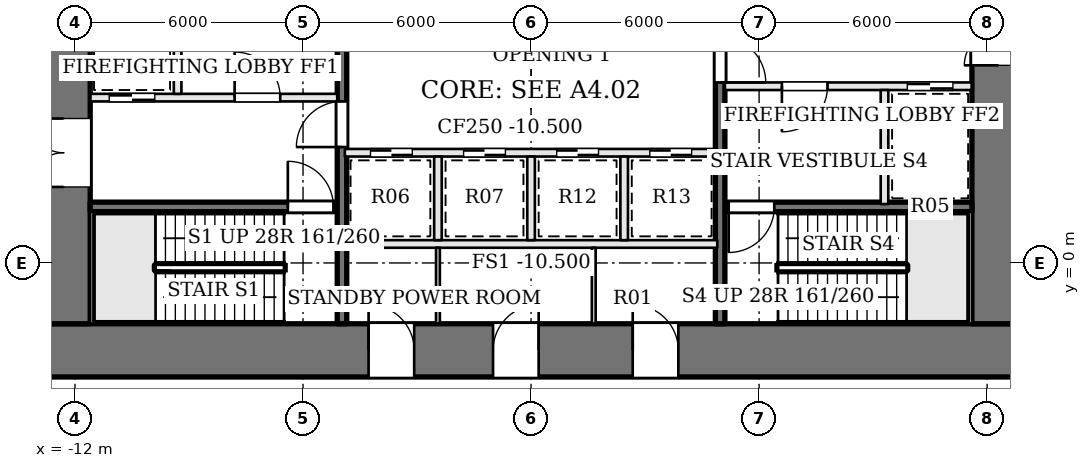
"""IFC4 building model, lengths in metres.
Left out: names, types, materials, properties, quantities, classifications, styles, units other than length and angle.
Written with IfcOpenShell. Run it as: python <this file> out.ifc"""

import sys

from ifc_helpers import new_model, si_unit, direction, frame, frame_2d, origin, place, context, subcontext, project, spatial, rectangle, extrude, element, fill, save


model = new_model("IFC4")
c1 = context("Model", 3, precision=1e-05, world=origin(), true_north=direction((0.0, 1.0)))
c2 = subcontext(c1, "Body", "Model", "MODEL_VIEW")
j1 = project(units=[si_unit("LENGTHUNIT", "METRE"), si_unit("PLANEANGLEUNIT", "RADIAN")], contexts=[c1])
p1 = place(None, origin())
s1 = spatial("IfcSite", under=j1, at=p1, CompositionType="ELEMENT")
p2 = place(p1, origin())
s2 = spatial("IfcBuilding", under=s1, at=p2, CompositionType="ELEMENT")
p3 = place(p2, frame((0.0, 0.0, -10.5)))
s3 = spatial("IfcBuildingStorey", under=s2, at=p3, CompositionType="ELEMENT", Elevation=-10.5)
p4 = place(p3, frame((-13.0, -2.3, 0.0), z_axis=(0.0, 0.0, 1.0), x_axis=(1.0, 0.0, 0.0)))
e1 = element("IfcWall", 1, at=p4, inside=s3, PredefinedType="SHEAR", context=c2, shape_type="SweptSolid", body=[
    extrude(rectangle(XDim=26.0, YDim=1.4, at=frame_2d((13.0, 0.0))), origin(), (0.0, 0.0, 1.0), 4.5),
])
p5 = place(p4, frame((8.725, 0.0, 0.0)))
e2 = element("IfcOpeningElement", 2, at=p5, cuts=e1, PredefinedType="OPENING", context=c2, shape_type="SweptSolid", body=[
    extrude(rectangle(XDim=1.2, YDim=2.1, at=frame_2d((0.6, 1.05))), frame((0.0, 0.71, 0.0), z_axis=(0.0, -1.0, 0.0), x_axis=(1.0, 0.0, 0.0)), (0.0, 0.0, 1.0), 1.42),
])
p6 = place(p4, frame((12.0, 0.0, 0.0)))
e3 = element("IfcOpeningElement", 3, at=p6, cuts=e1, PredefinedType="OPENING", context=c2, shape_type="SweptSolid", body=[
    extrude(rectangle(XDim=1.2, YDim=2.1, at=frame_2d((0.6, 1.05))), frame((0.0, 0.71, 0.0), z_axis=(0.0, -1.0, 0.0), x_axis=(1.0, 0.0, 0.0)), (0.0, 0.0, 1.0), 1.42),
])
p7 = place(p4, frame((15.675, 0.0, 0.0)))
e4 = element("IfcOpeningElement", 4, at=p7, cuts=e1, PredefinedType="OPENING", context=c2, shape_type="SweptSolid", body=[
    extrude(rectangle(XDim=1.2, YDim=2.1, at=frame_2d((0.6, 1.05))), frame((0.0, 0.71, 0.0), z_axis=(0.0, -1.0, 0.0), x_axis=(1.0, 0.0, 0.0)), (0.0, 0.0, 1.0), 1.42),
])
p8 = place(p3, frame((12.3, -1.6, 0.0), z_axis=(0.0, 0.0, 1.0), x_axis=(0.0, 1.0, 0.0)))
e5 = element("IfcWall", 5, at=p8, inside=s3, PredefinedType="SHEAR", context=c2, shape_type="SweptSolid", body=[
    extrude(rectangle(XDim=12.2, YDim=1.4, at=frame_2d((6.1, 0.0))), origin(), (0.0, 0.0, 1.0), 4.5),
])
p9 = place(p8, frame((6.8, 0.0, 0.0)))
e6 = element("IfcOpeningElement", 6, at=p9, cuts=e5, PredefinedType="OPENING", context=c2, shape_type="SweptSolid", body=[
    extrude(rectangle(XDim=1.8, YDim=2.1, at=frame_2d((0.9, 1.05))), frame((0.0, 0.71, 0.0), z_axis=(0.0, -1.0, 0.0), x_axis=(1.0, 0.0, 0.0)), (0.0, 0.0, 1.0), 1.42),
])
p10 = place(p3, frame((-12.3, -1.6, 0.0), z_axis=(0.0, 0.0, 1.0), x_axis=(0.0, 1.0, 0.0)))
e7 = element("IfcWall", 7, at=p10, inside=s3, PredefinedType="SHEAR", context=c2, shape_type="SweptSolid", body=[
    extrude(rectangle(XDim=12.2, YDim=1.4, at=frame_2d((6.1, 0.0))), origin(), (0.0, 0.0, 1.0), 4.5),
])
p11 = place(p10, frame((3.6, 0.0, 0.0)))
e8 = element("IfcOpeningElement", 8, at=p11, cuts=e7, PredefinedType="OPENING", context=c2, shape_type="SweptSolid", body=[
    extrude(rectangle(XDim=1.8, YDim=2.1, at=frame_2d((0.9, 1.05))), frame((0.0, 0.71, 0.0), z_axis=(0.0, -1.0, 0.0), x_axis=(1.0, 0.0, 0.0)), (0.0, 0.0, 1.0), 1.42),
])
p12 = place(p3, frame((-11.6, 1.475, 0.0), z_axis=(0.0, 0.0, 1.0), x_axis=(1.0, 0.0, 0.0)))
e9 = element("IfcWall", 9, at=p12, inside=s3, PredefinedType="SOLIDWALL", context=c2, shape_type="SweptSolid", body=[
    extrude(rectangle(XDim=6.5, YDim=0.25, at=frame_2d((3.25, 0.0))), origin(), (0.0, 0.0, 1.0), 4.2),
])
p13 = place(p12, frame((5.2, 0.0, 0.0)))
e10 = element("IfcOpeningElement", 10, at=p13, cuts=e9, PredefinedType="OPENING", context=c2, shape_type="SweptSolid", body=[
    extrude(rectangle(XDim=1.2, YDim=2.1, at=frame_2d((0.6, 1.05))), frame((0.0, 0.135, 0.0), z_axis=(0.0, -1.0, 0.0), x_axis=(1.0, 0.0, 0.0)), (0.0, 0.0, 1.0), 0.27),
])
p14 = place(p3, frame((-11.6, 4.35, 0.0), z_axis=(0.0, 0.0, 1.0), x_axis=(1.0, 0.0, 0.0)))
e11 = element("IfcWall", 11, at=p14, inside=s3, PredefinedType="SOLIDWALL", context=c2, shape_type="SweptSolid", body=[
    extrude(rectangle(XDim=6.5, YDim=0.2, at=frame_2d((3.25, 0.0))), origin(), (0.0, 0.0, 1.0), 4.2),
])
p15 = place(p14, frame((3.8, 0.0, 0.0)))
e12 = element("IfcOpeningElement", 12, at=p15, cuts=e11, PredefinedType="OPENING", context=c2, shape_type="SweptSolid", body=[
    extrude(rectangle(XDim=1.2, YDim=2.1, at=frame_2d((0.6, 1.05))), frame((0.0, 0.11, 0.0), z_axis=(0.0, -1.0, 0.0), x_axis=(1.0, 0.0, 0.0)), (0.0, 0.0, 1.0), 0.22),
])
p16 = place(p14, frame((0.5, 0.0, 0.0)))
e13 = element("IfcOpeningElement", 13, at=p16, cuts=e11, PredefinedType="OPENING", context=c2, shape_type="SweptSolid", body=[
    extrude(rectangle(XDim=1.2, YDim=2.1, at=frame_2d((0.6, 1.05))), frame((0.0, 0.11, 0.0), z_axis=(0.0, -1.0, 0.0), x_axis=(1.0, 0.0, 0.0)), (0.0, 0.0, 1.0), 0.22),
])
p17 = place(p3, frame((11.6, 4.65, 0.0), z_axis=(0.0, 0.0, 1.0), x_axis=(-1.0, 0.0, 0.0)))
e14 = element("IfcWall", 14, at=p17, inside=s3, PredefinedType="SOLIDWALL", context=c2, shape_type="SweptSolid", body=[
    extrude(rectangle(XDim=6.5, YDim=0.2, at=frame_2d((3.25, 0.0))), origin(), (0.0, 0.0, 1.0), 4.2),
])
p18 = place(p17, frame((3.8, 0.0, 0.0)))
e15 = element("IfcOpeningElement", 15, at=p18, cuts=e14, PredefinedType="OPENING", context=c2, shape_type="SweptSolid", body=[
    extrude(rectangle(XDim=1.2, YDim=2.1, at=frame_2d((0.6, 1.05))), frame((0.0, 0.11, 0.0), z_axis=(0.0, -1.0, 0.0), x_axis=(1.0, 0.0, 0.0)), (0.0, 0.0, 1.0), 0.22),
])
p19 = place(p17, frame((0.5, 0.0, 0.0)))
e16 = element("IfcOpeningElement", 16, at=p19, cuts=e14, PredefinedType="OPENING", context=c2, shape_type="SweptSolid", body=[
    extrude(rectangle(XDim=1.2, YDim=2.1, at=frame_2d((0.6, 1.05))), frame((0.0, 0.11, 0.0), z_axis=(0.0, -1.0, 0.0), x_axis=(1.0, 0.0, 0.0)), (0.0, 0.0, 1.0), 0.22),
])
p20 = place(p3, frame((11.6, 1.475, 0.0), z_axis=(0.0, 0.0, 1.0), x_axis=(-1.0, 0.0, 0.0)))
e17 = element("IfcWall", 17, at=p20, inside=s3, PredefinedType="SOLIDWALL", context=c2, shape_type="SweptSolid", body=[
    extrude(rectangle(XDim=6.5, YDim=0.25, at=frame_2d((3.25, 0.0))), origin(), (0.0, 0.0, 1.0), 4.2),
])
p21 = place(p20, frame((5.2, 0.0, 0.0)))
e18 = element("IfcOpeningElement", 18, at=p21, cuts=e17, PredefinedType="OPENING", context=c2, shape_type="SweptSolid", body=[
    extrude(rectangle(XDim=1.2, YDim=2.1, at=frame_2d((0.6, 1.05))), frame((0.0, 0.135, 0.0), z_axis=(0.0, -1.0, 0.0), x_axis=(1.0, 0.0, 0.0)), (0.0, 0.0, 1.0), 0.27),
])
for number, where, z_axis, x_axis in (
    (19, (-9.3, 4.45, 0.0), (0.0, 0.0, 1.0), (0.0, 1.0, 0.0)),
    (20, (9.3, 4.55, 0.0), (0.0, 0.0, 1.0), (0.0, -1.0, 0.0)),
):
    element("IfcWall", number, at=place(p3, frame(where, z_axis=z_axis, x_axis=x_axis)), inside=s3, PredefinedType="SOLIDWALL", context=c2, shape_type="SweptSolid", body=[
        extrude(rectangle(XDim=3.0, YDim=0.2, at=frame_2d((1.5, 0.0))), origin(), (0.0, 0.0, 1.0), 4.2),
    ])
p22 = place(p3, frame((-4.975, -1.6, 0.0), z_axis=(0.0, 0.0, 1.0), x_axis=(0.0, 1.0, 0.0)))
e21 = element("IfcWall", 21, at=p22, inside=s3, PredefinedType="SOLIDWALL", context=c2, shape_type="SweptSolid", body=[
    extrude(rectangle(XDim=12.2, YDim=0.25, at=frame_2d((6.1, 0.0))), origin(), (0.0, 0.0, 1.0), 4.2),
])
p23 = place(p22, frame((4.65, 0.0, 0.0)))
e22 = element("IfcOpeningElement", 22, at=p23, cuts=e21, PredefinedType="OPENING", context=c2, shape_type="SweptSolid", body=[
    extrude(rectangle(XDim=1.2, YDim=2.1, at=frame_2d((0.6, 1.05))), frame((0.0, 0.135, 0.0), z_axis=(0.0, -1.0, 0.0), x_axis=(1.0, 0.0, 0.0)), (0.0, 0.0, 1.0), 0.27),
])
p24 = place(p3, frame((4.975, 10.6, 0.0), z_axis=(0.0, 0.0, 1.0), x_axis=(0.0, -1.0, 0.0)))
e23 = element("IfcWall", 23, at=p24, inside=s3, PredefinedType="SOLIDWALL", context=c2, shape_type="SweptSolid", body=[
    extrude(rectangle(XDim=12.2, YDim=0.25, at=frame_2d((6.1, 0.0))), origin(), (0.0, 0.0, 1.0), 4.2),
])
p25 = place(p24, frame((4.65, 0.0, 0.0)))
e24 = element("IfcOpeningElement", 24, at=p25, cuts=e23, PredefinedType="OPENING", context=c2, shape_type="SweptSolid", body=[
    extrude(rectangle(XDim=1.2, YDim=2.1, at=frame_2d((0.6, 1.05))), frame((0.0, 0.135, 0.0), z_axis=(0.0, -1.0, 0.0), x_axis=(1.0, 0.0, 0.0)), (0.0, 0.0, 1.0), 0.27),
])
p26 = place(p3, frame((-4.9, 0.5, 0.0), z_axis=(0.0, 0.0, 1.0), x_axis=(1.0, 0.0, 0.0)))
e25 = element("IfcWall", 25, at=p26, inside=s3, PredefinedType="SOLIDWALL", context=c2, shape_type="SweptSolid", body=[
    extrude(rectangle(XDim=9.8, YDim=0.2, at=frame_2d((4.9, 0.0))), origin(), (0.0, 0.0, 1.0), 4.2),
])
p27 = place(p3, frame((-4.9, 2.9, 0.0), z_axis=(0.0, 0.0, 1.0), x_axis=(1.0, 0.0, 0.0)))
e26 = element("IfcWall", 26, at=p27, inside=s3, PredefinedType="SOLIDWALL", context=c2, shape_type="SweptSolid", body=[
    extrude(rectangle(XDim=9.8, YDim=0.2, at=frame_2d((4.9, 0.0))), origin(), (0.0, 0.0, 1.0), 4.2),
])
p28 = place(p27, frame((0.675, 0.0, 0.0)))
e27 = element("IfcOpeningElement", 27, at=p28, cuts=e26, PredefinedType="OPENING", context=c2, shape_type="SweptSolid", body=[
    extrude(rectangle(XDim=1.1, YDim=2.1, at=frame_2d((0.55, 1.05))), frame((0.0, 0.11, 0.0), z_axis=(0.0, -1.0, 0.0), x_axis=(1.0, 0.0, 0.0)), (0.0, 0.0, 1.0), 0.22),
])
p29 = place(p27, frame((3.125, 0.0, 0.0)))
e28 = element("IfcOpeningElement", 28, at=p29, cuts=e26, PredefinedType="OPENING", context=c2, shape_type="SweptSolid", body=[
    extrude(rectangle(XDim=1.1, YDim=2.1, at=frame_2d((0.55, 1.05))), frame((0.0, 0.11, 0.0), z_axis=(0.0, -1.0, 0.0), x_axis=(1.0, 0.0, 0.0)), (0.0, 0.0, 1.0), 0.22),
])
p30 = place(p27, frame((5.575, 0.0, 0.0)))
e29 = element("IfcOpeningElement", 29, at=p30, cuts=e26, PredefinedType="OPENING", context=c2, shape_type="SweptSolid", body=[
    extrude(rectangle(XDim=1.1, YDim=2.1, at=frame_2d((0.55, 1.05))), frame((0.0, 0.11, 0.0), z_axis=(0.0, -1.0, 0.0), x_axis=(1.0, 0.0, 0.0)), (0.0, 0.0, 1.0), 0.22),
])
p31 = place(p27, frame((8.025, 0.0, 0.0)))
e30 = element("IfcOpeningElement", 30, at=p31, cuts=e26, PredefinedType="OPENING", context=c2, shape_type="SweptSolid", body=[
    extrude(rectangle(XDim=1.1, YDim=2.1, at=frame_2d((0.55, 1.05))), frame((0.0, 0.11, 0.0), z_axis=(0.0, -1.0, 0.0), x_axis=(1.0, 0.0, 0.0)), (0.0, 0.0, 1.0), 0.22),
])
for number, where, z_axis, x_axis in (
    (31, (-2.45, 0.6, 0.0), (0.0, 0.0, 1.0), (0.0, 1.0, 0.0)),
    (32, (0.0, 0.6, 0.0), (0.0, 0.0, 1.0), (0.0, 1.0, 0.0)),
    (33, (2.45, 0.6, 0.0), (0.0, 0.0, 1.0), (0.0, 1.0, 0.0)),
):
    element("IfcWall", number, at=place(p3, frame(where, z_axis=z_axis, x_axis=x_axis)), inside=s3, PredefinedType="SOLIDWALL", context=c2, shape_type="SweptSolid", body=[
        extrude(rectangle(XDim=2.2, YDim=0.2, at=frame_2d((1.1, 0.0))), origin(), (0.0, 0.0, 1.0), 4.2),
    ])
for number, where, z_axis, x_axis in (
    (34, (-2.45, -1.6, 0.0), (0.0, 0.0, 1.0), (0.0, 1.0, 0.0)),
    (35, (1.65, -1.6, 0.0), (0.0, 0.0, 1.0), (0.0, 1.0, 0.0)),
):
    element("IfcWall", number, at=place(p3, frame(where, z_axis=z_axis, x_axis=x_axis)), inside=s3, PredefinedType="PARTITIONING", context=c2, shape_type="SweptSolid", body=[
        extrude(rectangle(XDim=2.0, YDim=0.1, at=frame_2d((1.0, 0.0))), origin(), (0.0, 0.0, 1.0), 4.2),
    ])
p32 = place(p11, origin())
e36 = element("IfcDoor", 36, at=p32, inside=s3, OperationType="DOUBLE_DOOR_SINGLE_SWING", PredefinedType="DOOR", context=c2, shape_type="SweptSolid", body=[
    extrude(rectangle(XDim=1.8, YDim=2.1, at=frame_2d((0.9, 1.05))), frame((0.0, 0.025, 0.0), z_axis=(0.0, -1.0, 0.0), x_axis=(1.0, 0.0, 0.0)), (0.0, 0.0, 1.0), 0.05),
])
fill(e8, e36)
p33 = place(p9, origin())
e37 = element("IfcDoor", 37, at=p33, inside=s3, OperationType="DOUBLE_DOOR_SINGLE_SWING", PredefinedType="DOOR", context=c2, shape_type="SweptSolid", body=[
    extrude(rectangle(XDim=1.8, YDim=2.1, at=frame_2d((0.9, 1.05))), frame((0.0, 0.025, 0.0), z_axis=(0.0, -1.0, 0.0), x_axis=(1.0, 0.0, 0.0)), (0.0, 0.0, 1.0), 0.05),
])
fill(e6, e37)
p34 = place(p23, origin())
e38 = element("IfcDoor", 38, at=p34, inside=s3, OperationType="SINGLE_SWING_LEFT", PredefinedType="DOOR", context=c2, shape_type="SweptSolid", body=[
    extrude(rectangle(XDim=1.2, YDim=2.1, at=frame_2d((0.6, 1.05))), frame((0.0, 0.025, 0.0), z_axis=(0.0, -1.0, 0.0), x_axis=(1.0, 0.0, 0.0)), (0.0, 0.0, 1.0), 0.05),
])
fill(e22, e38)
p35 = place(p25, origin())
e39 = element("IfcDoor", 39, at=p35, inside=s3, OperationType="SINGLE_SWING_RIGHT", PredefinedType="DOOR", context=c2, shape_type="SweptSolid", body=[
    extrude(rectangle(XDim=1.2, YDim=2.1, at=frame_2d((0.6, 1.05))), frame((0.0, 0.025, 0.0), z_axis=(0.0, -1.0, 0.0), x_axis=(1.0, 0.0, 0.0)), (0.0, 0.0, 1.0), 0.05),
])
fill(e24, e39)
p36 = place(p15, origin())
e40 = element("IfcDoor", 40, at=p36, inside=s3, OperationType="SINGLE_SWING_LEFT", PredefinedType="DOOR", context=c2, shape_type="SweptSolid", body=[
    extrude(rectangle(XDim=1.2, YDim=2.1, at=frame_2d((0.6, 1.05))), frame((0.0, 0.025, 0.0), z_axis=(0.0, -1.0, 0.0), x_axis=(1.0, 0.0, 0.0)), (0.0, 0.0, 1.0), 0.05),
])
fill(e12, e40)
p37 = place(p18, origin())
e41 = element("IfcDoor", 41, at=p37, inside=s3, OperationType="SINGLE_SWING_RIGHT", PredefinedType="DOOR", context=c2, shape_type="SweptSolid", body=[
    extrude(rectangle(XDim=1.2, YDim=2.1, at=frame_2d((0.6, 1.05))), frame((0.0, 0.025, 0.0), z_axis=(0.0, -1.0, 0.0), x_axis=(1.0, 0.0, 0.0)), (0.0, 0.0, 1.0), 0.05),
])
fill(e15, e41)
p38 = place(p13, origin())
e42 = element("IfcDoor", 42, at=p38, inside=s3, OperationType="SINGLE_SWING_LEFT", PredefinedType="DOOR", context=c2, shape_type="SweptSolid", body=[
    extrude(rectangle(XDim=1.2, YDim=2.1, at=frame_2d((0.6, 1.05))), frame((0.0, 0.025, 0.0), z_axis=(0.0, -1.0, 0.0), x_axis=(1.0, 0.0, 0.0)), (0.0, 0.0, 1.0), 0.05),
])
fill(e10, e42)
p39 = place(p21, origin())
e43 = element("IfcDoor", 43, at=p39, inside=s3, OperationType="SINGLE_SWING_RIGHT", PredefinedType="DOOR", context=c2, shape_type="SweptSolid", body=[
    extrude(rectangle(XDim=1.2, YDim=2.1, at=frame_2d((0.6, 1.05))), frame((0.0, 0.025, 0.0), z_axis=(0.0, -1.0, 0.0), x_axis=(1.0, 0.0, 0.0)), (0.0, 0.0, 1.0), 0.05),
])
fill(e18, e43)
p40 = place(p16, origin())
e44 = element("IfcDoor", 44, at=p40, inside=s3, OperationType="SLIDING_TO_RIGHT", PredefinedType="DOOR", context=c2, shape_type="SweptSolid", body=[
    extrude(rectangle(XDim=1.2, YDim=2.1, at=frame_2d((0.6, 1.05))), frame((0.0, 0.025, 0.0), z_axis=(0.0, -1.0, 0.0), x_axis=(1.0, 0.0, 0.0)), (0.0, 0.0, 1.0), 0.05),
])
fill(e13, e44)
p41 = place(p19, origin())
e45 = element("IfcDoor", 45, at=p41, inside=s3, OperationType="SLIDING_TO_RIGHT", PredefinedType="DOOR", context=c2, shape_type="SweptSolid", body=[
    extrude(rectangle(XDim=1.2, YDim=2.1, at=frame_2d((0.6, 1.05))), frame((0.0, 0.025, 0.0), z_axis=(0.0, -1.0, 0.0), x_axis=(1.0, 0.0, 0.0)), (0.0, 0.0, 1.0), 0.05),
])
fill(e16, e45)
p42 = place(p28, origin())
e46 = element("IfcDoor", 46, at=p42, inside=s3, OperationType="SLIDING_TO_RIGHT", PredefinedType="DOOR", context=c2, shape_type="SweptSolid", body=[
    extrude(rectangle(XDim=1.1, YDim=2.1, at=frame_2d((0.55, 1.05))), frame((0.0, 0.025, 0.0), z_axis=(0.0, -1.0, 0.0), x_axis=(1.0, 0.0, 0.0)), (0.0, 0.0, 1.0), 0.05),
])
fill(e27, e46)
p43 = place(p29, origin())
e47 = element("IfcDoor", 47, at=p43, inside=s3, OperationType="SLIDING_TO_LEFT", PredefinedType="DOOR", context=c2, shape_type="SweptSolid", body=[
    extrude(rectangle(XDim=1.1, YDim=2.1, at=frame_2d((0.55, 1.05))), frame((0.0, 0.025, 0.0), z_axis=(0.0, -1.0, 0.0), x_axis=(1.0, 0.0, 0.0)), (0.0, 0.0, 1.0), 0.05),
])
fill(e28, e47)
p44 = place(p30, origin())
e48 = element("IfcDoor", 48, at=p44, inside=s3, OperationType="SLIDING_TO_LEFT", PredefinedType="DOOR", context=c2, shape_type="SweptSolid", body=[
    extrude(rectangle(XDim=1.1, YDim=2.1, at=frame_2d((0.55, 1.05))), frame((0.0, 0.025, 0.0), z_axis=(0.0, -1.0, 0.0), x_axis=(1.0, 0.0, 0.0)), (0.0, 0.0, 1.0), 0.05),
])
fill(e29, e48)
p45 = place(p31, origin())
e49 = element("IfcDoor", 49, at=p45, inside=s3, OperationType="SLIDING_TO_RIGHT", PredefinedType="DOOR", context=c2, shape_type="SweptSolid", body=[
    extrude(rectangle(XDim=1.1, YDim=2.1, at=frame_2d((0.55, 1.05))), frame((0.0, 0.025, 0.0), z_axis=(0.0, -1.0, 0.0), x_axis=(1.0, 0.0, 0.0)), (0.0, 0.0, 1.0), 0.05),
])
fill(e30, e49)
p46 = place(p5, origin())
e50 = element("IfcDoor", 50, at=p46, inside=s3, OperationType="SINGLE_SWING_LEFT", PredefinedType="DOOR", context=c2, shape_type="SweptSolid", body=[
    extrude(rectangle(XDim=1.2, YDim=2.1, at=frame_2d((0.6, 1.05))), frame((0.0, 0.025, 0.0), z_axis=(0.0, -1.0, 0.0), x_axis=(1.0, 0.0, 0.0)), (0.0, 0.0, 1.0), 0.05),
])
fill(e2, e50)
p47 = place(p6, origin())
e51 = element("IfcDoor", 51, at=p47, inside=s3, OperationType="SINGLE_SWING_RIGHT", PredefinedType="DOOR", context=c2, shape_type="SweptSolid", body=[
    extrude(rectangle(XDim=1.2, YDim=2.1, at=frame_2d((0.6, 1.05))), frame((0.0, 0.025, 0.0), z_axis=(0.0, -1.0, 0.0), x_axis=(1.0, 0.0, 0.0)), (0.0, 0.0, 1.0), 0.05),
])
fill(e3, e51)
p48 = place(p7, origin())
e52 = element("IfcDoor", 52, at=p48, inside=s3, OperationType="SINGLE_SWING_LEFT", PredefinedType="DOOR", context=c2, shape_type="SweptSolid", body=[
    extrude(rectangle(XDim=1.2, YDim=2.1, at=frame_2d((0.6, 1.05))), frame((0.0, 0.025, 0.0), z_axis=(0.0, -1.0, 0.0), x_axis=(1.0, 0.0, 0.0)), (0.0, 0.0, 1.0), 0.05),
])
fill(e4, e52)
save(model, sys.argv[1])
